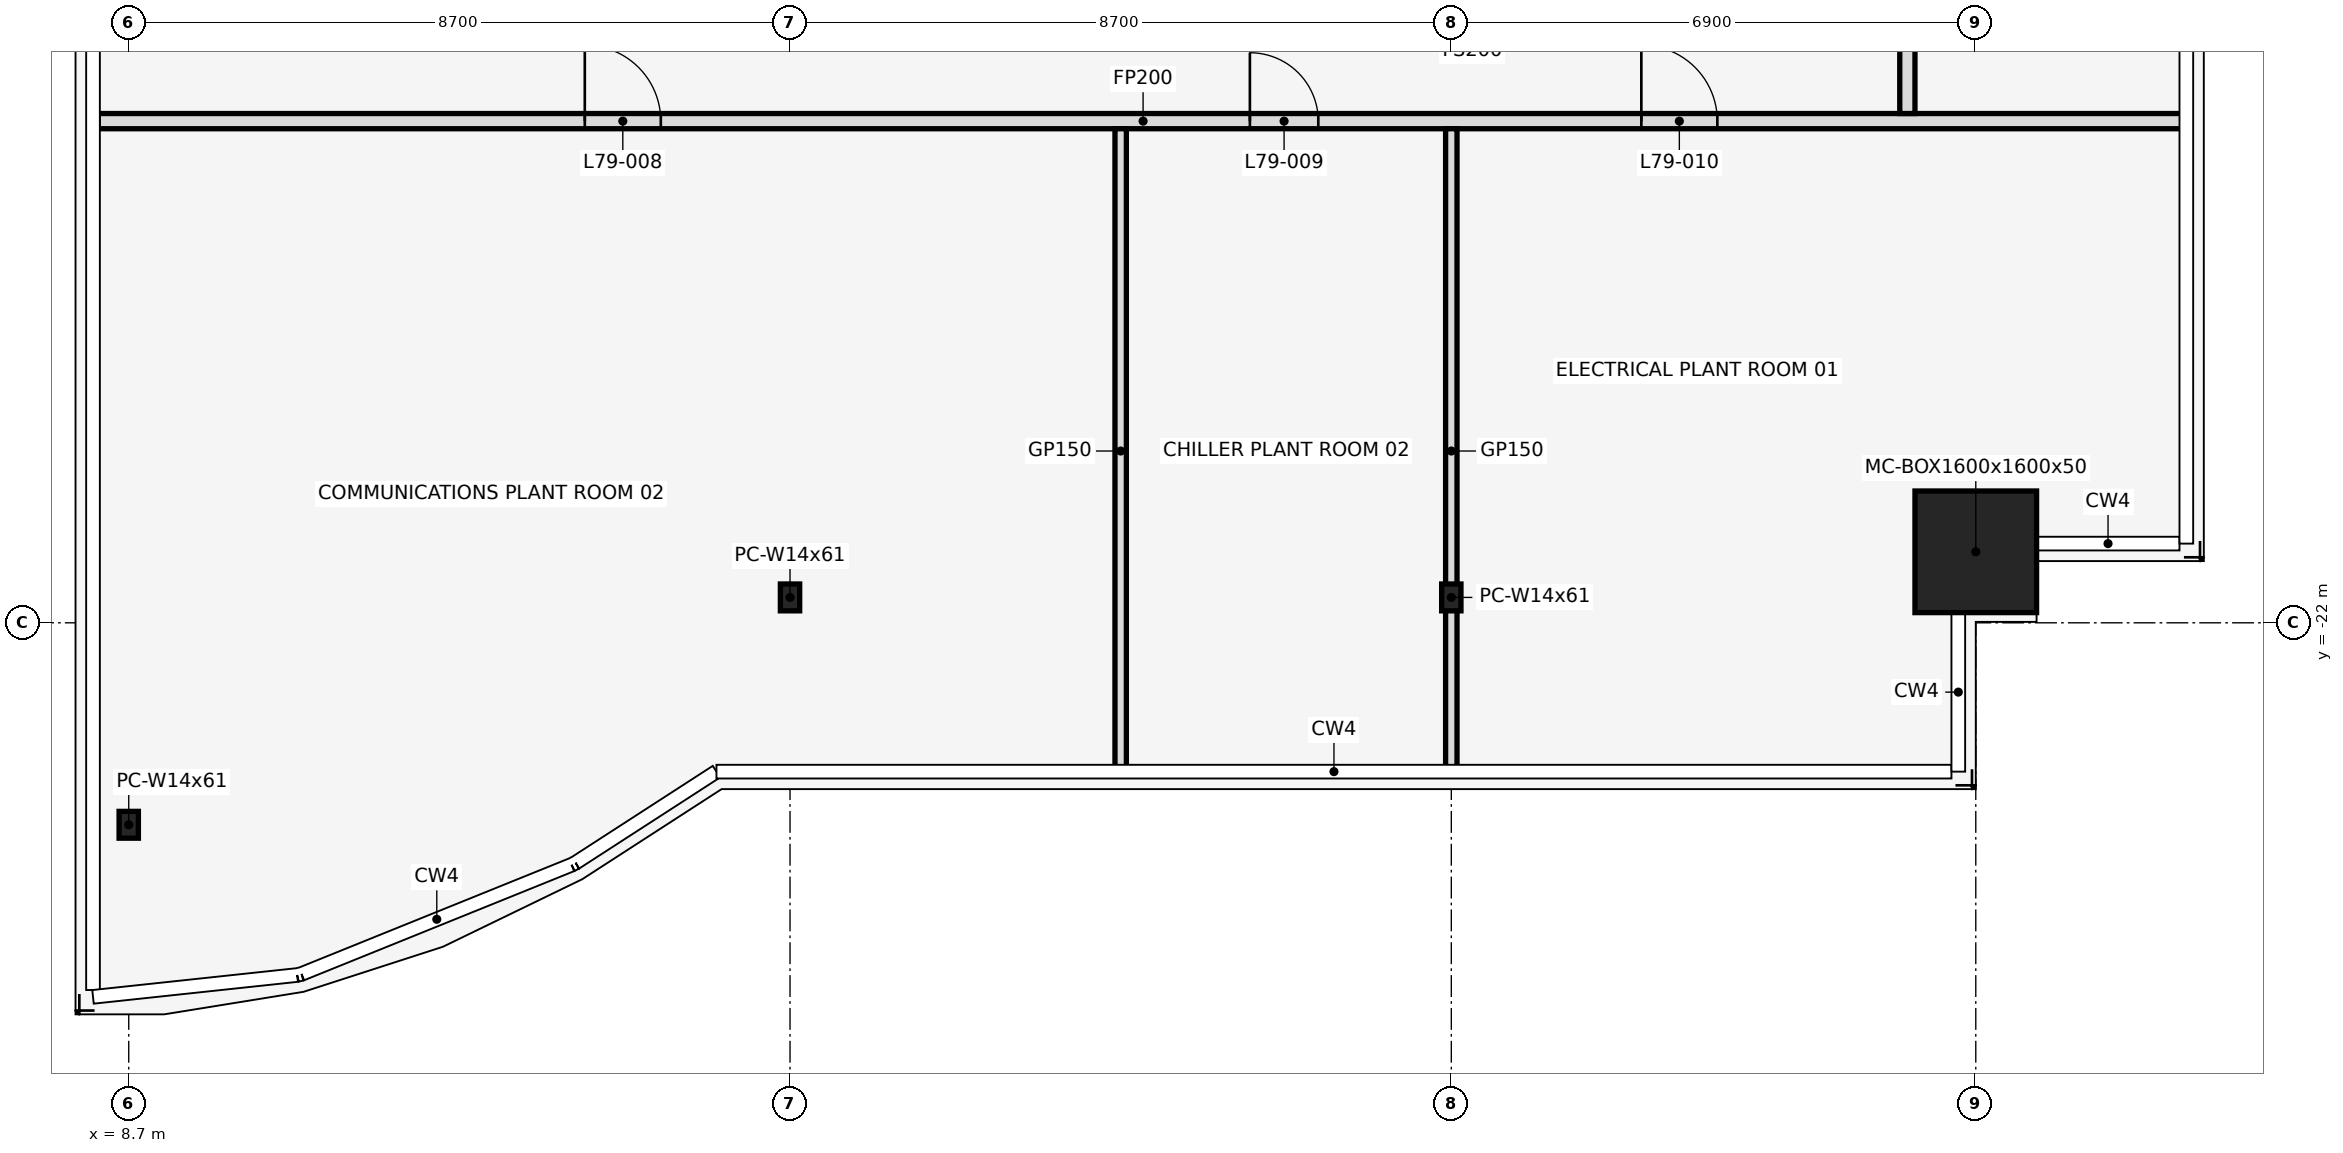
"""IFC4 building model, lengths in metres.
Left out: names, types, materials, properties, quantities, classifications, styles, units other than length and angle.
Written with IfcOpenShell. Run it as: python <this file> out.ifc"""

import sys

from ifc_helpers import new_model, si_unit, direction, frame, frame_2d, origin, origin_2d, place, context, subcontext, project, spatial, rectangle, hollow_rectangle, i_section, extrude, element, fill, save


model = new_model("IFC4")
c1 = context("Model", 3, precision=1e-05, world=origin(), true_north=direction((0.0, 1.0)))
c2 = subcontext(c1, "Body", "Model", "MODEL_VIEW")
j1 = project(units=[si_unit("LENGTHUNIT", "METRE"), si_unit("PLANEANGLEUNIT", "RADIAN")], contexts=[c1])
p1 = place(None, origin())
s1 = spatial("IfcSite", under=j1, at=p1, CompositionType="ELEMENT")
p2 = place(p1, origin())
s2 = spatial("IfcBuilding", under=s1, at=p2, CompositionType="ELEMENT")
p3 = place(p2, frame((0.0, 0.0, 352.4)))
s3 = spatial("IfcBuildingStorey", under=s2, at=p3, CompositionType="ELEMENT", Elevation=352.4)
for number, where, z_axis, x_axis in (
    (1, (8.7, -24.657, 0.0), (0.0, 0.0, 1.0), (1.0, 0.0, 0.0)),
    (2, (17.4, -21.666, 0.0), (0.0, 0.0, 1.0), (1.0, 0.0, 0.0)),
    (3, (26.1, -21.666, 0.0), (0.0, 0.0, 1.0), (1.0, 0.0, 0.0)),
):
    element("IfcColumn", number, at=place(p3, frame(where, z_axis=z_axis, x_axis=x_axis)), inside=s3, PredefinedType="COLUMN", context=c2, shape_type="SweptSolid", body=[
        extrude(i_section(OverallWidth=0.254, OverallDepth=0.353, WebThickness=0.01, FlangeThickness=0.016, at=origin_2d()), origin(), (0.0, 0.0, 1.0), 4.5),
    ])
p4 = place(p3, frame((33.0, -21.066, 0.0), z_axis=(0.0, 0.0, 1.0), x_axis=(1.0, 0.0, 0.0)))
e4 = element("IfcColumn", 4, at=p4, inside=s3, PredefinedType="COLUMN", context=c2, shape_type="SweptSolid", body=[
    extrude(hollow_rectangle(XDim=1.6, YDim=1.6, WallThickness=0.05, at=origin_2d()), origin(), (0.0, 0.0, 1.0), 4.5),
])
p5 = place(p3, frame((8.3, -15.4, 0.0), z_axis=(0.0, 0.0, 1.0), x_axis=(1.0, 0.0, 0.0)))
e5 = element("IfcWall", 5, at=p5, inside=s3, PredefinedType="PARTITIONING", context=c2, shape_type="SweptSolid", body=[
    extrude(rectangle(XDim=27.49, YDim=0.2, at=frame_2d((13.745, 0.0))), origin(), (0.0, 0.0, 1.0), 3.368),
])
p6 = place(p5, frame((6.4, 0.0, 0.0)))
e6 = element("IfcOpeningElement", 6, at=p6, cuts=e5, PredefinedType="OPENING", context=c2, shape_type="SweptSolid", body=[
    extrude(rectangle(XDim=1.0, YDim=2.1, at=frame_2d((0.5, 1.05))), frame((0.0, 0.112, 0.0), z_axis=(0.0, -1.0, 0.0), x_axis=(1.0, 0.0, 0.0)), (0.0, 0.0, 1.0), 0.224),
])
p7 = place(p5, frame((15.15, 0.0, 0.0)))
e7 = element("IfcOpeningElement", 7, at=p7, cuts=e5, PredefinedType="OPENING", context=c2, shape_type="SweptSolid", body=[
    extrude(rectangle(XDim=0.9, YDim=2.1, at=frame_2d((0.45, 1.05))), frame((0.0, 0.112, 0.0), z_axis=(0.0, -1.0, 0.0), x_axis=(1.0, 0.0, 0.0)), (0.0, 0.0, 1.0), 0.224),
])
p8 = place(p5, frame((20.3, 0.0, 0.0)))
e8 = element("IfcOpeningElement", 8, at=p8, cuts=e5, PredefinedType="OPENING", context=c2, shape_type="SweptSolid", body=[
    extrude(rectangle(XDim=1.0, YDim=2.1, at=frame_2d((0.5, 1.05))), frame((0.0, 0.112, 0.0), z_axis=(0.0, -1.0, 0.0), x_axis=(1.0, 0.0, 0.0)), (0.0, 0.0, 1.0), 0.224),
])
for number, where, z_axis, x_axis in (
    (9, (21.75, -23.98, 0.0), (0.0, 0.0, 1.0), (0.0, 1.0, 0.0)),
    (10, (26.1, -23.98, 0.0), (0.0, 0.0, 1.0), (0.0, 1.0, 0.0)),
):
    element("IfcWall", number, at=place(p3, frame(where, z_axis=z_axis, x_axis=x_axis)), inside=s3, PredefinedType="PARTITIONING", context=c2, shape_type="SweptSolid", body=[
        extrude(rectangle(XDim=8.48, YDim=0.15, at=frame_2d((4.24, 0.0))), origin(), (0.0, 0.0, 1.0), 3.368),
    ])
p9 = place(p3, frame((32.1, -15.3, 0.0), z_axis=(0.0, 0.0, 1.0), x_axis=(0.0, 1.0, 0.0)))
e11 = element("IfcWall", 11, at=p9, inside=s3, PredefinedType="PARTITIONING", context=c2, shape_type="SweptSolid", body=[
    extrude(rectangle(XDim=2.2, YDim=0.2, at=frame_2d((1.1, 0.0))), origin(), (0.0, 0.0, 1.0), 3.368),
])
p10 = place(p6, frame((1.0, 0.0, 0.0), z_axis=(0.0, 0.0, 1.0), x_axis=(-1.0, 0.0, 0.0)))
e12 = element("IfcDoor", 12, at=p10, inside=s3, OperationType="SINGLE_SWING_RIGHT", PredefinedType="DOOR", context=c2, shape_type="SweptSolid", body=[
    extrude(rectangle(XDim=1.0, YDim=2.1, at=frame_2d((0.5, 1.05))), frame((0.0, 0.025, 0.0), z_axis=(0.0, -1.0, 0.0), x_axis=(1.0, 0.0, 0.0)), (0.0, 0.0, 1.0), 0.05),
])
fill(e6, e12)
p11 = place(p7, frame((0.9, 0.0, 0.0), z_axis=(0.0, 0.0, 1.0), x_axis=(-1.0, 0.0, 0.0)))
e13 = element("IfcDoor", 13, at=p11, inside=s3, OperationType="SINGLE_SWING_RIGHT", PredefinedType="DOOR", context=c2, shape_type="SweptSolid", body=[
    extrude(rectangle(XDim=0.9, YDim=2.1, at=frame_2d((0.45, 1.05))), frame((0.0, 0.025, 0.0), z_axis=(0.0, -1.0, 0.0), x_axis=(1.0, 0.0, 0.0)), (0.0, 0.0, 1.0), 0.05),
])
fill(e7, e13)
p12 = place(p8, frame((1.0, 0.0, 0.0), z_axis=(0.0, 0.0, 1.0), x_axis=(-1.0, 0.0, 0.0)))
e14 = element("IfcDoor", 14, at=p12, inside=s3, OperationType="SINGLE_SWING_LEFT", PredefinedType="DOOR", context=c2, shape_type="SweptSolid", body=[
    extrude(rectangle(XDim=1.0, YDim=2.1, at=frame_2d((0.5, 1.05))), frame((0.0, 0.025, 0.0), z_axis=(0.0, -1.0, 0.0), x_axis=(1.0, 0.0, 0.0)), (0.0, 0.0, 1.0), 0.05),
])
fill(e8, e14)
save(model, sys.argv[1])
